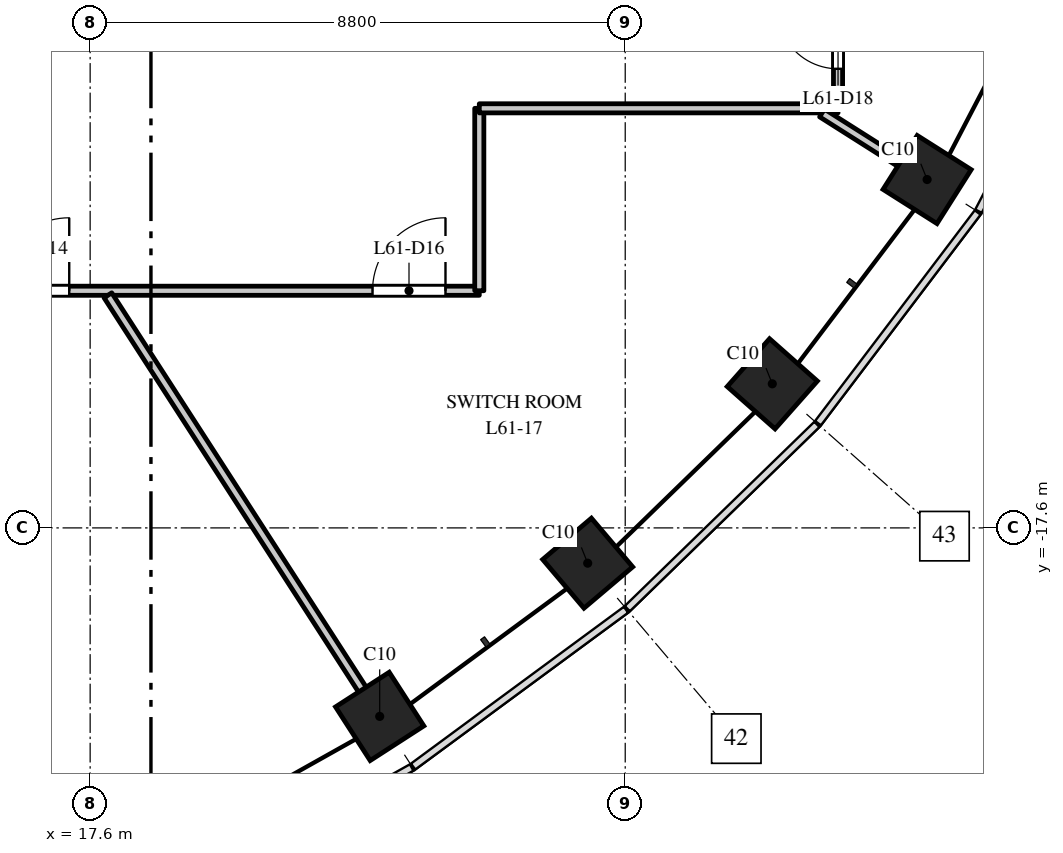
"""IFC4 building model, lengths in metres.
Left out: names, types, materials, properties, quantities, classifications, styles, units other than length and angle.
Written with IfcOpenShell. Run it as: python <this file> out.ifc"""

import sys

from ifc_helpers import new_model, si_unit, direction, frame, frame_2d, origin, origin_2d, place, context, subcontext, project, spatial, rectangle, extrude, element, fill, save


model = new_model("IFC4")
c1 = context("Model", 3, precision=1e-05, world=origin(), true_north=direction((0.0, 1.0)))
c2 = subcontext(c1, "Body", "Model", "MODEL_VIEW")
j1 = project(units=[si_unit("LENGTHUNIT", "METRE"), si_unit("PLANEANGLEUNIT", "RADIAN")], contexts=[c1])
p1 = place(None, origin())
s1 = spatial("IfcSite", under=j1, at=p1, CompositionType="ELEMENT")
p2 = place(p1, origin())
s2 = spatial("IfcBuilding", under=s1, at=p2, CompositionType="ELEMENT")
p3 = place(p2, frame((0.0, 0.0, 285.5)))
s3 = spatial("IfcBuildingStorey", under=s2, at=p3, CompositionType="ELEMENT", Elevation=285.5)
for number, where, z_axis, x_axis in (
    (1, (22.362, -20.7, 0.0), (0.0, 0.0, 1.0), (0.84, 0.542, 0.0)),
    (2, (25.783, -18.18, 0.0), (0.0, 0.0, 1.0), (0.763, 0.646, 0.0)),
    (3, (28.819, -15.23, 0.0), (0.0, 0.0, 1.0), (0.663, 0.749, 0.0)),
    (4, (31.365, -11.871, 0.0), (0.0, 0.0, 1.0), (0.535, 0.845, 0.0)),
):
    element("IfcColumn", number, at=place(p3, frame(where, z_axis=z_axis, x_axis=x_axis)), inside=s3, PredefinedType="COLUMN", context=c2, shape_type="SweptSolid", body=[
        extrude(rectangle(XDim=1.05, YDim=1.05, at=origin_2d()), origin(), (0.0, 0.0, 1.0), 5.5),
    ])
p4 = place(p3, frame((7.672, -13.7, 0.0), z_axis=(0.0, 0.0, 1.0), x_axis=(1.0, 0.0, 0.0)))
e5 = element("IfcWall", 5, at=p4, inside=s3, PredefinedType="PARTITIONING", context=c2, shape_type="SweptSolid", body=[
    extrude(rectangle(XDim=16.328, YDim=0.15, at=frame_2d((8.164, 0.0))), origin(), (0.0, 0.0, 1.0), 4.35),
])
p5 = place(p4, frame((8.384, 0.0, 0.0)))
e6 = element("IfcOpeningElement", 6, at=p5, cuts=e5, PredefinedType="OPENING", context=c2, shape_type="SweptSolid", body=[
    extrude(rectangle(XDim=1.2, YDim=2.1, at=frame_2d((0.6, 1.05))), frame((0.0, 0.085, 0.0), z_axis=(0.0, -1.0, 0.0), x_axis=(1.0, 0.0, 0.0)), (0.0, 0.0, 1.0), 0.17),
])
p6 = place(p4, frame((14.572, 0.0, 0.0)))
e7 = element("IfcOpeningElement", 7, at=p6, cuts=e5, PredefinedType="OPENING", context=c2, shape_type="SweptSolid", body=[
    extrude(rectangle(XDim=1.2, YDim=2.1, at=frame_2d((0.6, 1.05))), frame((0.0, 0.085, 0.0), z_axis=(0.0, -1.0, 0.0), x_axis=(1.0, 0.0, 0.0)), (0.0, 0.0, 1.0), 0.17),
])
p7 = place(p3, frame((17.892, -13.775, 0.0), z_axis=(0.0, 0.0, 1.0), x_axis=(0.542293508104, -0.840189116252, 0.0)))
e8 = element("IfcWall", 8, at=p7, inside=s3, PredefinedType="PARTITIONING", context=c2, shape_type="SweptSolid", body=[
    extrude(rectangle(XDim=8.342, YDim=0.15, at=frame_2d((4.171, 0.0))), origin(), (0.0, 0.0, 1.0), 5.2),
])
p8 = place(p3, frame((24.0, -13.7, 0.0), z_axis=(0.0, 0.0, 1.0), x_axis=(0.0, 1.0, 0.0)))
e9 = element("IfcWall", 9, at=p8, inside=s3, PredefinedType="PARTITIONING", context=c2, shape_type="SweptSolid", body=[
    extrude(rectangle(XDim=3.0, YDim=0.15, at=frame_2d((1.5, 0.0))), origin(), (0.0, 0.0, 1.0), 4.25),
])
p9 = place(p3, frame((24.0, -10.7, 0.0), z_axis=(0.0, 0.0, 1.0), x_axis=(1.0, 0.0, 0.0)))
e10 = element("IfcWall", 10, at=p9, inside=s3, PredefinedType="PARTITIONING", context=c2, shape_type="SweptSolid", body=[
    extrude(rectangle(XDim=5.9, YDim=0.15, at=frame_2d((2.95, 0.0))), origin(), (0.0, 0.0, 1.0), 5.2),
])
p10 = place(p3, frame((29.637, -10.777, 0.0), z_axis=(0.0, 0.0, 1.0), x_axis=(0.844747041197, -0.535165802709, 0.0)))
e11 = element("IfcWall", 11, at=p10, inside=s3, PredefinedType="PARTITIONING", context=c2, shape_type="SweptSolid", body=[
    extrude(rectangle(XDim=2.145, YDim=0.15, at=frame_2d((1.073, 0.0))), origin(), (0.0, 0.0, 1.0), 5.2),
])
p11 = place(p3, frame((29.9, -10.7, 0.0), z_axis=(0.0, 0.0, 1.0), x_axis=(0.0, 1.0, 0.0)))
e12 = element("IfcWall", 12, at=p11, inside=s3, PredefinedType="PARTITIONING", context=c2, shape_type="SweptSolid", body=[
    extrude(rectangle(XDim=2.2, YDim=0.15, at=frame_2d((1.1, 0.0))), origin(), (0.0, 0.0, 1.0), 5.2),
])
p12 = place(p11, frame((0.65, 0.0, 0.0)))
e13 = element("IfcOpeningElement", 13, at=p12, cuts=e12, PredefinedType="OPENING", context=c2, shape_type="SweptSolid", body=[
    extrude(rectangle(XDim=1.0, YDim=2.1, at=frame_2d((0.5, 1.05))), frame((0.0, 0.085, 0.0), z_axis=(0.0, -1.0, 0.0), x_axis=(1.0, 0.0, 0.0)), (0.0, 0.0, 1.0), 0.17),
])
p13 = place(p5, origin())
e14 = element("IfcDoor", 14, at=p13, inside=s3, OperationType="SINGLE_SWING_RIGHT", PredefinedType="DOOR", context=c2, shape_type="SweptSolid", body=[
    extrude(rectangle(XDim=1.2, YDim=2.1, at=frame_2d((0.6, 1.05))), frame((0.0, 0.025, 0.0), z_axis=(0.0, -1.0, 0.0), x_axis=(1.0, 0.0, 0.0)), (0.0, 0.0, 1.0), 0.05),
])
fill(e6, e14)
p14 = place(p6, origin())
e15 = element("IfcDoor", 15, at=p14, inside=s3, OperationType="SINGLE_SWING_RIGHT", PredefinedType="DOOR", context=c2, shape_type="SweptSolid", body=[
    extrude(rectangle(XDim=1.2, YDim=2.1, at=frame_2d((0.6, 1.05))), frame((0.0, 0.025, 0.0), z_axis=(0.0, -1.0, 0.0), x_axis=(1.0, 0.0, 0.0)), (0.0, 0.0, 1.0), 0.05),
])
fill(e7, e15)
p15 = place(p12, origin())
e16 = element("IfcDoor", 16, at=p15, inside=s3, OperationType="SINGLE_SWING_RIGHT", PredefinedType="DOOR", context=c2, shape_type="SweptSolid", body=[
    extrude(rectangle(XDim=1.0, YDim=2.1, at=frame_2d((0.5, 1.05))), frame((0.0, 0.025, 0.0), z_axis=(0.0, -1.0, 0.0), x_axis=(1.0, 0.0, 0.0)), (0.0, 0.0, 1.0), 0.05),
])
fill(e13, e16)
save(model, sys.argv[1])
